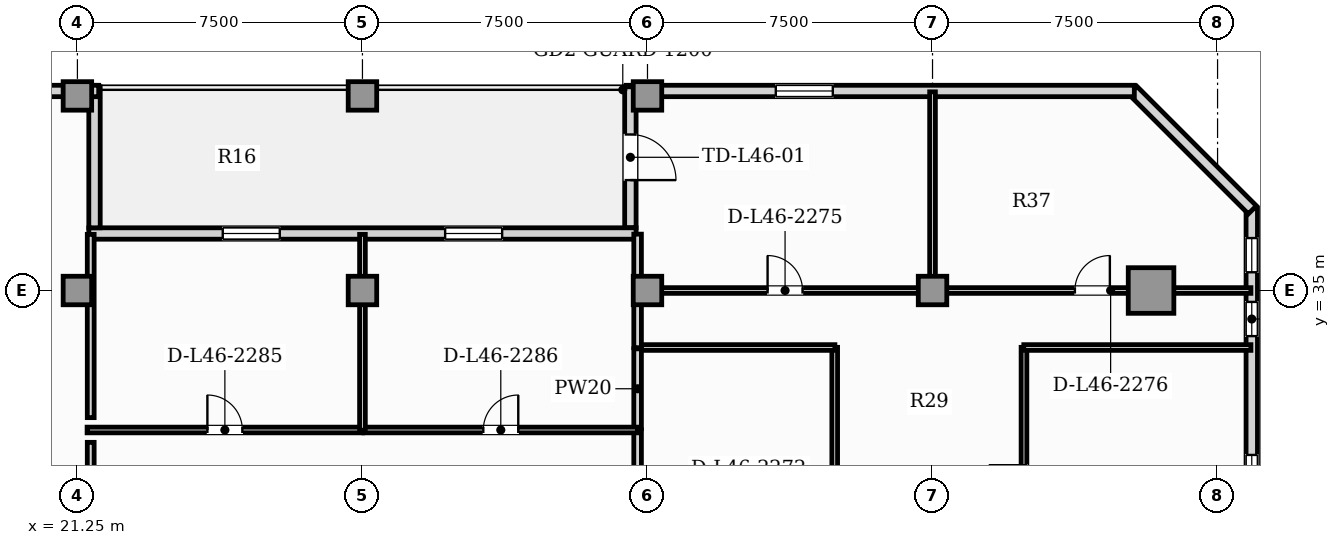
"""IFC4 building model, lengths in metres.
Left out: names, types, materials, properties, quantities, classifications, styles, units other than length and angle.
Written with IfcOpenShell. Run it as: python <this file> out.ifc"""

import sys

from ifc_helpers import new_model, si_unit, direction, frame, frame_2d, origin, origin_2d, place, context, subcontext, project, spatial, rectangle, hollow_rectangle, extrude, element, fill, save


model = new_model("IFC4")
c1 = context("Model", 3, precision=1e-05, world=origin(), true_north=direction((0.0, 1.0)))
c2 = subcontext(c1, "Body", "Model", "MODEL_VIEW")
j1 = project(units=[si_unit("LENGTHUNIT", "METRE"), si_unit("PLANEANGLEUNIT", "RADIAN")], contexts=[c1])
p1 = place(None, origin())
s1 = spatial("IfcSite", under=j1, at=p1, CompositionType="ELEMENT")
p2 = place(p1, origin())
s2 = spatial("IfcBuilding", under=s1, at=p2, CompositionType="ELEMENT")
p3 = place(p2, frame((0.0, 0.0, 187.55)))
s3 = spatial("IfcBuildingStorey", under=s2, at=p3, CompositionType="ELEMENT", Elevation=187.55)
p4 = place(p3, frame((49.5, 35.0, 0.0), z_axis=(0.0, 0.0, 1.0), x_axis=(1.0, 0.0, 0.0)))
e1 = element("IfcColumn", 1, at=p4, inside=s3, PredefinedType="USERDEFINED", context=c2, shape_type="SweptSolid", body=[
    extrude(hollow_rectangle(XDim=1.2, YDim=1.2, WallThickness=0.07, at=origin_2d()), origin(), (0.0, 0.0, 1.0), 5.05),
])
for number, where, z_axis, x_axis in (
    (2, (21.25, 40.12, 0.0), (0.0, 0.0, 1.0), (1.0, 0.0, 0.0)),
    (3, (28.75, 40.12, 0.0), (0.0, 0.0, 1.0), (1.0, 0.0, 0.0)),
    (4, (36.25, 40.12, 0.0), (0.0, 0.0, 1.0), (1.0, 0.0, 0.0)),
    (5, (21.25, 35.0, 0.0), (0.0, 0.0, 1.0), (1.0, 0.0, 0.0)),
    (6, (28.75, 35.0, 0.0), (0.0, 0.0, 1.0), (1.0, 0.0, 0.0)),
    (7, (36.25, 35.0, 0.0), (0.0, 0.0, 1.0), (1.0, 0.0, 0.0)),
    (8, (43.75, 35.0, 0.0), (0.0, 0.0, 1.0), (1.0, 0.0, 0.0)),
):
    element("IfcColumn", number, at=place(p3, frame(where, z_axis=z_axis, x_axis=x_axis)), inside=s3, PredefinedType="COLUMN", context=c2, shape_type="SweptSolid", body=[
        extrude(rectangle(XDim=0.75, YDim=0.75, at=origin_2d()), origin(), (0.0, 0.0, 1.0), 5.05),
    ])
p5 = place(p3, frame((52.15, 3.24, 0.0), z_axis=(0.0, 0.0, 1.0), x_axis=(0.0, 1.0, 0.0)))
e9 = element("IfcWall", 9, at=p5, inside=s3, PredefinedType="SOLIDWALL", context=c2, shape_type="SweptSolid", body=[
    extrude(rectangle(XDim=33.92, YDim=0.3, at=frame_2d((16.96, 0.0))), origin(), (0.0, 0.0, 1.0), 4.83),
])
p6 = place(p5, frame((30.56, 0.0, 0.95)))
e10 = element("IfcOpeningElement", 10, at=p6, cuts=e9, PredefinedType="OPENING", context=c2, shape_type="SweptSolid", body=[
    extrude(rectangle(XDim=0.9, YDim=1.5, at=frame_2d((0.45, 0.75))), frame((0.0, 0.16, 0.0), z_axis=(0.0, -1.0, 0.0), x_axis=(1.0, 0.0, 0.0)), (0.0, 0.0, 1.0), 0.32),
])
p7 = place(p5, frame((10.805, 0.0, 0.9)))
e11 = element("IfcOpeningElement", 11, at=p7, cuts=e9, PredefinedType="OPENING", context=c2, shape_type="SweptSolid", body=[
    extrude(rectangle(XDim=1.5, YDim=1.95, at=frame_2d((0.75, 0.975))), frame((0.0, 0.16, 0.0), z_axis=(0.0, -1.0, 0.0), x_axis=(1.0, 0.0, 0.0)), (0.0, 0.0, 1.0), 0.32),
])
p8 = place(p5, frame((14.462, 0.0, 0.9)))
e12 = element("IfcOpeningElement", 12, at=p8, cuts=e9, PredefinedType="OPENING", context=c2, shape_type="SweptSolid", body=[
    extrude(rectangle(XDim=1.5, YDim=1.95, at=frame_2d((0.75, 0.975))), frame((0.0, 0.16, 0.0), z_axis=(0.0, -1.0, 0.0), x_axis=(1.0, 0.0, 0.0)), (0.0, 0.0, 1.0), 0.32),
])
p9 = place(p5, frame((19.726, 0.0, 0.9)))
e13 = element("IfcOpeningElement", 13, at=p9, cuts=e9, PredefinedType="OPENING", context=c2, shape_type="SweptSolid", body=[
    extrude(rectangle(XDim=1.5, YDim=1.95, at=frame_2d((0.75, 0.975))), frame((0.0, 0.16, 0.0), z_axis=(0.0, -1.0, 0.0), x_axis=(1.0, 0.0, 0.0)), (0.0, 0.0, 1.0), 0.32),
])
p10 = place(p5, frame((25.934, 0.0, 0.9)))
e14 = element("IfcOpeningElement", 14, at=p10, cuts=e9, PredefinedType="OPENING", context=c2, shape_type="SweptSolid", body=[
    extrude(rectangle(XDim=1.5, YDim=1.95, at=frame_2d((0.75, 0.975))), frame((0.0, 0.16, 0.0), z_axis=(0.0, -1.0, 0.0), x_axis=(1.0, 0.0, 0.0)), (0.0, 0.0, 1.0), 0.32),
])
p11 = place(p5, frame((32.24, 0.0, 0.95)))
e15 = element("IfcOpeningElement", 15, at=p11, cuts=e9, PredefinedType="OPENING", context=c2, shape_type="SweptSolid", body=[
    extrude(rectangle(XDim=0.9, YDim=1.5, at=frame_2d((0.45, 0.75))), frame((0.0, 0.16, 0.0), z_axis=(0.0, -1.0, 0.0), x_axis=(1.0, 0.0, 0.0)), (0.0, 0.0, 1.0), 0.32),
])
p12 = place(p3, frame((52.166, 37.122, 0.0), z_axis=(0.0, 0.0, 1.0), x_axis=(-0.707106781187, 0.707106781187, 0.0)))
e16 = element("IfcWall", 16, at=p12, inside=s3, PredefinedType="SOLIDWALL", context=c2, shape_type="SweptSolid", body=[
    extrude(rectangle(XDim=4.445, YDim=0.3, at=frame_2d((2.223, 0.0))), origin(), (0.0, 0.0, 1.0), 4.83),
])
p13 = place(p3, frame((49.06, 40.25, 0.0), z_axis=(0.0, 0.0, 1.0), x_axis=(-1.0, 0.0, 0.0)))
e17 = element("IfcWall", 17, at=p13, inside=s3, PredefinedType="SOLIDWALL", context=c2, shape_type="SweptSolid", body=[
    extrude(rectangle(XDim=13.37, YDim=0.3, at=frame_2d((6.685, 0.0))), origin(), (0.0, 0.0, 1.0), 4.37),
])
p14 = place(p13, frame((7.934, 0.0, 0.9)))
e18 = element("IfcOpeningElement", 18, at=p14, cuts=e17, PredefinedType="OPENING", context=c2, shape_type="SweptSolid", body=[
    extrude(rectangle(XDim=1.5, YDim=1.95, at=frame_2d((0.75, 0.975))), frame((0.0, 0.16, 0.0), z_axis=(0.0, -1.0, 0.0), x_axis=(1.0, 0.0, 0.0)), (0.0, 0.0, 1.0), 0.32),
])
p15 = place(p3, frame((35.8, 40.36, 0.0), z_axis=(0.0, 0.0, 1.0), x_axis=(0.0, -1.0, 0.0)))
e19 = element("IfcWall", 19, at=p15, inside=s3, PredefinedType="SOLIDWALL", context=c2, shape_type="SweptSolid", body=[
    extrude(rectangle(XDim=3.71, YDim=0.3, at=frame_2d((1.855, 0.0))), origin(), (0.0, 0.0, 1.0), 4.83),
])
p16 = place(p15, frame((1.255, 0.0, 0.0)))
e20 = element("IfcOpeningElement", 20, at=p16, cuts=e19, PredefinedType="OPENING", context=c2, shape_type="SweptSolid", body=[
    extrude(rectangle(XDim=1.2, YDim=2.2, at=frame_2d((0.6, 1.1))), frame((0.0, 0.16, 0.0), z_axis=(0.0, -1.0, 0.0), x_axis=(1.0, 0.0, 0.0)), (0.0, 0.0, 1.0), 0.32),
])
p17 = place(p3, frame((35.95, 36.5, 0.0), z_axis=(0.0, 0.0, 1.0), x_axis=(-1.0, 0.0, 0.0)))
e21 = element("IfcWall", 21, at=p17, inside=s3, PredefinedType="SOLIDWALL", context=c2, shape_type="SweptSolid", body=[
    extrude(rectangle(XDim=14.4, YDim=0.3, at=frame_2d((7.2, 0.0))), origin(), (0.0, 0.0, 1.0), 4.83),
])
p18 = place(p17, frame((9.376, 0.0, 0.9)))
e22 = element("IfcOpeningElement", 22, at=p18, cuts=e21, PredefinedType="OPENING", context=c2, shape_type="SweptSolid", body=[
    extrude(rectangle(XDim=1.5, YDim=1.95, at=frame_2d((0.75, 0.975))), frame((0.0, 0.16, 0.0), z_axis=(0.0, -1.0, 0.0), x_axis=(1.0, 0.0, 0.0)), (0.0, 0.0, 1.0), 0.32),
])
p19 = place(p17, frame((3.524, 0.0, 0.9)))
e23 = element("IfcOpeningElement", 23, at=p19, cuts=e21, PredefinedType="OPENING", context=c2, shape_type="SweptSolid", body=[
    extrude(rectangle(XDim=1.5, YDim=1.95, at=frame_2d((0.75, 0.975))), frame((0.0, 0.16, 0.0), z_axis=(0.0, -1.0, 0.0), x_axis=(1.0, 0.0, 0.0)), (0.0, 0.0, 1.0), 0.32),
])
p20 = place(p3, frame((21.7, 36.65, 0.0), z_axis=(0.0, 0.0, 1.0), x_axis=(0.0, 1.0, 0.0)))
e24 = element("IfcWall", 24, at=p20, inside=s3, PredefinedType="SOLIDWALL", context=c2, shape_type="SweptSolid", body=[
    extrude(rectangle(XDim=3.71, YDim=0.3, at=frame_2d((1.855, 0.0))), origin(), (0.0, 0.0, 1.0), 4.83),
])
p21 = place(p3, frame((21.81, 40.25, 0.0), z_axis=(0.0, 0.0, 1.0), x_axis=(-1.0, 0.0, 0.0)))
e25 = element("IfcWall", 25, at=p21, inside=s3, PredefinedType="SOLIDWALL", context=c2, shape_type="SweptSolid", body=[
    extrude(rectangle(XDim=13.37, YDim=0.3, at=frame_2d((6.685, 0.0))), origin(), (0.0, 0.0, 1.0), 4.37),
])
p22 = place(p21, frame((11.1, 0.0, 0.9)))
e26 = element("IfcOpeningElement", 26, at=p22, cuts=e25, PredefinedType="OPENING", context=c2, shape_type="SweptSolid", body=[
    extrude(rectangle(XDim=1.5, YDim=1.95, at=frame_2d((0.75, 0.975))), frame((0.0, 0.16, 0.0), z_axis=(0.0, -1.0, 0.0), x_axis=(1.0, 0.0, 0.0)), (0.0, 0.0, 1.0), 0.32),
])
p23 = place(p21, frame((8.725, 0.0, 0.9)))
e27 = element("IfcOpeningElement", 27, at=p23, cuts=e25, PredefinedType="OPENING", context=c2, shape_type="SweptSolid", body=[
    extrude(rectangle(XDim=1.5, YDim=1.95, at=frame_2d((0.75, 0.975))), frame((0.0, 0.16, 0.0), z_axis=(0.0, -1.0, 0.0), x_axis=(1.0, 0.0, 0.0)), (0.0, 0.0, 1.0), 0.32),
])
p24 = place(p3, frame((41.177, 23.756, 0.0), z_axis=(0.0, 0.0, 1.0), x_axis=(0.0, 1.0, 0.0)))
e28 = element("IfcWall", 28, at=p24, inside=s3, PredefinedType="PARTITIONING", context=c2, shape_type="SweptSolid", body=[
    extrude(rectangle(XDim=9.749, YDim=0.15, at=frame_2d((4.875, 0.0))), origin(), (0.0, 0.0, 1.0), 4.83),
])
p25 = place(p24, frame((4.415, 0.0, 0.0)))
e29 = element("IfcOpeningElement", 29, at=p25, cuts=e28, PredefinedType="OPENING", context=c2, shape_type="SweptSolid", body=[
    extrude(rectangle(XDim=0.92, YDim=2.1, at=frame_2d((0.46, 1.05))), frame((0.0, 0.085, 0.0), z_axis=(0.0, -1.0, 0.0), x_axis=(1.0, 0.0, 0.0)), (0.0, 0.0, 1.0), 0.17),
])
p26 = place(p3, frame((35.985, 33.5, 0.0), z_axis=(0.0, 0.0, 1.0), x_axis=(1.0, 0.0, 0.0)))
e30 = element("IfcWall", 30, at=p26, inside=s3, PredefinedType="PARTITIONING", context=c2, shape_type="SweptSolid", body=[
    extrude(rectangle(XDim=5.196, YDim=0.15, at=frame_2d((2.598, 0.0))), origin(), (0.0, 0.0, 1.0), 4.83),
])
p27 = place(p3, frame((46.156, 26.382, 0.0), z_axis=(0.0, 0.0, 1.0), x_axis=(0.0, 1.0, 0.0)))
e31 = element("IfcWall", 31, at=p27, inside=s3, PredefinedType="PARTITIONING", context=c2, shape_type="SweptSolid", body=[
    extrude(rectangle(XDim=7.123, YDim=0.15, at=frame_2d((3.561, 0.0))), origin(), (0.0, 0.0, 1.0), 4.83),
])
p28 = place(p27, frame((3.101, 0.0, 0.0)))
e32 = element("IfcOpeningElement", 32, at=p28, cuts=e31, PredefinedType="OPENING", context=c2, shape_type="SweptSolid", body=[
    extrude(rectangle(XDim=0.92, YDim=2.1, at=frame_2d((0.46, 1.05))), frame((0.0, 0.085, 0.0), z_axis=(0.0, -1.0, 0.0), x_axis=(1.0, 0.0, 0.0)), (0.0, 0.0, 1.0), 0.17),
])
p29 = place(p3, frame((46.151, 33.5, 0.0), z_axis=(0.0, 0.0, 1.0), x_axis=(1.0, 0.0, 0.0)))
e33 = element("IfcWall", 33, at=p29, inside=s3, PredefinedType="PARTITIONING", context=c2, shape_type="SweptSolid", body=[
    extrude(rectangle(XDim=5.976, YDim=0.15, at=frame_2d((2.988, 0.0))), origin(), (0.0, 0.0, 1.0), 4.83),
])
p30 = place(p3, frame((35.985, 35.0, 0.0), z_axis=(0.0, 0.0, 1.0), x_axis=(1.0, 0.0, 0.0)))
e34 = element("IfcWall", 34, at=p30, inside=s3, PredefinedType="PARTITIONING", context=c2, shape_type="SweptSolid", body=[
    extrude(rectangle(XDim=7.77, YDim=0.15, at=frame_2d((3.885, 0.0))), origin(), (0.0, 0.0, 1.0), 4.285),
])
p31 = place(p30, frame((3.425, 0.0, 0.0)))
e35 = element("IfcOpeningElement", 35, at=p31, cuts=e34, PredefinedType="OPENING", context=c2, shape_type="SweptSolid", body=[
    extrude(rectangle(XDim=0.92, YDim=2.1, at=frame_2d((0.46, 1.05))), frame((0.0, 0.085, 0.0), z_axis=(0.0, -1.0, 0.0), x_axis=(1.0, 0.0, 0.0)), (0.0, 0.0, 1.0), 0.17),
])
p32 = place(p3, frame((43.785, 35.0, 0.0), z_axis=(0.0, 0.0, 1.0), x_axis=(1.0, 0.0, 0.0)))
e36 = element("IfcWall", 36, at=p32, inside=s3, PredefinedType="PARTITIONING", context=c2, shape_type="SweptSolid", body=[
    extrude(rectangle(XDim=8.343, YDim=0.15, at=frame_2d((4.171, 0.0))), origin(), (0.0, 0.0, 1.0), 4.285),
])
p33 = place(p32, frame((3.711, 0.0, 0.0)))
e37 = element("IfcOpeningElement", 37, at=p33, cuts=e36, PredefinedType="OPENING", context=c2, shape_type="SweptSolid", body=[
    extrude(rectangle(XDim=0.92, YDim=2.1, at=frame_2d((0.46, 1.05))), frame((0.0, 0.085, 0.0), z_axis=(0.0, -1.0, 0.0), x_axis=(1.0, 0.0, 0.0)), (0.0, 0.0, 1.0), 0.17),
])
p34 = place(p3, frame((35.99, 33.495, 0.0), z_axis=(0.0, 0.0, 1.0), x_axis=(0.0, 1.0, 0.0)))
e38 = element("IfcWall", 38, at=p34, inside=s3, PredefinedType="PARTITIONING", context=c2, shape_type="SweptSolid", body=[
    extrude(rectangle(XDim=2.988, YDim=0.2, at=frame_2d((1.494, 0.0))), origin(), (0.0, 0.0, 1.0), 4.83),
])
p35 = place(p3, frame((35.99, 29.825, 0.0), z_axis=(0.0, 0.0, 1.0), x_axis=(0.0, 1.0, 0.0)))
e39 = element("IfcWall", 39, at=p35, inside=s3, PredefinedType="PARTITIONING", context=c2, shape_type="SweptSolid", body=[
    extrude(rectangle(XDim=1.51, YDim=0.2, at=frame_2d((0.755, 0.0))), origin(), (0.0, 0.0, 1.0), 4.83),
])
p36 = place(p3, frame((35.99, 31.365, 0.0), z_axis=(0.0, 0.0, 1.0), x_axis=(0.0, 1.0, 0.0)))
e40 = element("IfcWall", 40, at=p36, inside=s3, PredefinedType="PARTITIONING", context=c2, shape_type="SweptSolid", body=[
    extrude(rectangle(XDim=2.1, YDim=0.2, at=frame_2d((1.05, 0.0))), origin(), (0.0, 0.0, 1.0), 4.83),
])
p37 = place(p3, frame((43.75, 34.995, 0.0), z_axis=(0.0, 0.0, 1.0), x_axis=(0.0, 1.0, 0.0)))
e41 = element("IfcWall", 41, at=p37, inside=s3, PredefinedType="PARTITIONING", context=c2, shape_type="SweptSolid", body=[
    extrude(rectangle(XDim=5.232, YDim=0.15, at=frame_2d((2.616, 0.0))), origin(), (0.0, 0.0, 1.0), 4.83),
])
p38 = place(p3, frame((21.505, 31.33, 0.0), z_axis=(0.0, 0.0, 1.0), x_axis=(1.0, 0.0, 0.0)))
e42 = element("IfcWall", 42, at=p38, inside=s3, PredefinedType="PARTITIONING", context=c2, shape_type="SweptSolid", body=[
    extrude(rectangle(XDim=7.25, YDim=0.15, at=frame_2d((3.625, 0.0))), origin(), (0.0, 0.0, 1.0), 4.83),
])
p39 = place(p38, frame((3.165, 0.0, 0.0)))
e43 = element("IfcOpeningElement", 43, at=p39, cuts=e42, PredefinedType="OPENING", context=c2, shape_type="SweptSolid", body=[
    extrude(rectangle(XDim=0.92, YDim=2.1, at=frame_2d((0.46, 1.05))), frame((0.0, 0.085, 0.0), z_axis=(0.0, -1.0, 0.0), x_axis=(1.0, 0.0, 0.0)), (0.0, 0.0, 1.0), 0.17),
])
p40 = place(p3, frame((28.785, 31.33, 0.0), z_axis=(0.0, 0.0, 1.0), x_axis=(1.0, 0.0, 0.0)))
e44 = element("IfcWall", 44, at=p40, inside=s3, PredefinedType="PARTITIONING", context=c2, shape_type="SweptSolid", body=[
    extrude(rectangle(XDim=7.21, YDim=0.15, at=frame_2d((3.605, 0.0))), origin(), (0.0, 0.0, 1.0), 4.83),
])
p41 = place(p40, frame((3.145, 0.0, 0.0)))
e45 = element("IfcOpeningElement", 45, at=p41, cuts=e44, PredefinedType="OPENING", context=c2, shape_type="SweptSolid", body=[
    extrude(rectangle(XDim=0.92, YDim=2.1, at=frame_2d((0.46, 1.05))), frame((0.0, 0.085, 0.0), z_axis=(0.0, -1.0, 0.0), x_axis=(1.0, 0.0, 0.0)), (0.0, 0.0, 1.0), 0.17),
])
p42 = place(p3, frame((28.75, 31.325, 0.0), z_axis=(0.0, 0.0, 1.0), x_axis=(0.0, 1.0, 0.0)))
e46 = element("IfcWall", 46, at=p42, inside=s3, PredefinedType="PARTITIONING", context=c2, shape_type="SweptSolid", body=[
    extrude(rectangle(XDim=5.153, YDim=0.15, at=frame_2d((2.576, 0.0))), origin(), (0.0, 0.0, 1.0), 4.424),
])
p43 = place(p3, frame((21.6, 30.155, 0.0), z_axis=(0.0, 0.0, 1.0), x_axis=(0.0, 1.0, 0.0)))
e47 = element("IfcWall", 47, at=p43, inside=s3, PredefinedType="PARTITIONING", context=c2, shape_type="SweptSolid", body=[
    extrude(rectangle(XDim=0.85, YDim=0.18, at=frame_2d((0.425, 0.0))), origin(), (0.0, 0.0, 1.0), 4.83),
])
p44 = place(p3, frame((21.6, 31.655, 0.0), z_axis=(0.0, 0.0, 1.0), x_axis=(0.0, 1.0, 0.0)))
e48 = element("IfcWall", 48, at=p44, inside=s3, PredefinedType="PARTITIONING", context=c2, shape_type="SweptSolid", body=[
    extrude(rectangle(XDim=4.823, YDim=0.18, at=frame_2d((2.411, 0.0))), origin(), (0.0, 0.0, 1.0), 4.83),
])
p45 = place(p16, frame((1.2, 0.0, 0.0), z_axis=(0.0, 0.0, 1.0), x_axis=(-1.0, 0.0, 0.0)))
e49 = element("IfcDoor", 49, at=p45, inside=s3, OperationType="SINGLE_SWING_LEFT", PredefinedType="DOOR", context=c2, shape_type="SweptSolid", body=[
    extrude(rectangle(XDim=1.2, YDim=2.2, at=frame_2d((0.6, 1.1))), frame((0.0, 0.025, 0.0), z_axis=(0.0, -1.0, 0.0), x_axis=(1.0, 0.0, 0.0)), (0.0, 0.0, 1.0), 0.05),
])
fill(e20, e49)
p46 = place(p6, origin())
e50 = element("IfcWindow", 50, at=p46, inside=s3, PartitioningType="SINGLE_PANEL", PredefinedType="WINDOW", context=c2, shape_type="SweptSolid", body=[
    extrude(rectangle(XDim=0.9, YDim=1.5, at=frame_2d((0.45, 0.75))), frame((0.0, 0.03, 0.0), z_axis=(0.0, -1.0, 0.0), x_axis=(1.0, 0.0, 0.0)), (0.0, 0.0, 1.0), 0.06),
])
fill(e10, e50)
p47 = place(p10, origin())
e51 = element("IfcWindow", 51, at=p47, inside=s3, PartitioningType="SINGLE_PANEL", PredefinedType="WINDOW", context=c2, shape_type="SweptSolid", body=[
    extrude(rectangle(XDim=1.5, YDim=1.95, at=frame_2d((0.75, 0.975))), frame((0.0, 0.03, 0.0), z_axis=(0.0, -1.0, 0.0), x_axis=(1.0, 0.0, 0.0)), (0.0, 0.0, 1.0), 0.06),
])
fill(e14, e51)
p48 = place(p14, origin())
e52 = element("IfcWindow", 52, at=p48, inside=s3, PartitioningType="SINGLE_PANEL", PredefinedType="WINDOW", context=c2, shape_type="SweptSolid", body=[
    extrude(rectangle(XDim=1.5, YDim=1.95, at=frame_2d((0.75, 0.975))), frame((0.0, 0.03, 0.0), z_axis=(0.0, -1.0, 0.0), x_axis=(1.0, 0.0, 0.0)), (0.0, 0.0, 1.0), 0.06),
])
fill(e18, e52)
p49 = place(p11, origin())
e53 = element("IfcWindow", 53, at=p49, inside=s3, PartitioningType="SINGLE_PANEL", PredefinedType="WINDOW", context=c2, shape_type="SweptSolid", body=[
    extrude(rectangle(XDim=0.9, YDim=1.5, at=frame_2d((0.45, 0.75))), frame((0.0, 0.03, 0.0), z_axis=(0.0, -1.0, 0.0), x_axis=(1.0, 0.0, 0.0)), (0.0, 0.0, 1.0), 0.06),
])
fill(e15, e53)
p50 = place(p18, origin())
e54 = element("IfcWindow", 54, at=p50, inside=s3, PartitioningType="SINGLE_PANEL", PredefinedType="WINDOW", context=c2, shape_type="SweptSolid", body=[
    extrude(rectangle(XDim=1.5, YDim=1.95, at=frame_2d((0.75, 0.975))), frame((0.0, 0.03, 0.0), z_axis=(0.0, -1.0, 0.0), x_axis=(1.0, 0.0, 0.0)), (0.0, 0.0, 1.0), 0.06),
])
fill(e22, e54)
p51 = place(p19, origin())
e55 = element("IfcWindow", 55, at=p51, inside=s3, PartitioningType="SINGLE_PANEL", PredefinedType="WINDOW", context=c2, shape_type="SweptSolid", body=[
    extrude(rectangle(XDim=1.5, YDim=1.95, at=frame_2d((0.75, 0.975))), frame((0.0, 0.03, 0.0), z_axis=(0.0, -1.0, 0.0), x_axis=(1.0, 0.0, 0.0)), (0.0, 0.0, 1.0), 0.06),
])
fill(e23, e55)
p52 = place(p31, origin())
e56 = element("IfcDoor", 56, at=p52, inside=s3, OperationType="SINGLE_SWING_LEFT", PredefinedType="DOOR", context=c2, shape_type="SweptSolid", body=[
    extrude(rectangle(XDim=0.92, YDim=2.1, at=frame_2d((0.46, 1.05))), frame((0.0, 0.025, 0.0), z_axis=(0.0, -1.0, 0.0), x_axis=(1.0, 0.0, 0.0)), (0.0, 0.0, 1.0), 0.05),
])
fill(e35, e56)
p53 = place(p33, origin())
e57 = element("IfcDoor", 57, at=p53, inside=s3, OperationType="SINGLE_SWING_RIGHT", PredefinedType="DOOR", context=c2, shape_type="SweptSolid", body=[
    extrude(rectangle(XDim=0.92, YDim=2.1, at=frame_2d((0.46, 1.05))), frame((0.0, 0.025, 0.0), z_axis=(0.0, -1.0, 0.0), x_axis=(1.0, 0.0, 0.0)), (0.0, 0.0, 1.0), 0.05),
])
fill(e37, e57)
p54 = place(p39, origin())
e58 = element("IfcDoor", 58, at=p54, inside=s3, OperationType="SINGLE_SWING_LEFT", PredefinedType="DOOR", context=c2, shape_type="SweptSolid", body=[
    extrude(rectangle(XDim=0.92, YDim=2.1, at=frame_2d((0.46, 1.05))), frame((0.0, 0.025, 0.0), z_axis=(0.0, -1.0, 0.0), x_axis=(1.0, 0.0, 0.0)), (0.0, 0.0, 1.0), 0.05),
])
fill(e43, e58)
p55 = place(p41, origin())
e59 = element("IfcDoor", 59, at=p55, inside=s3, OperationType="SINGLE_SWING_RIGHT", PredefinedType="DOOR", context=c2, shape_type="SweptSolid", body=[
    extrude(rectangle(XDim=0.92, YDim=2.1, at=frame_2d((0.46, 1.05))), frame((0.0, 0.025, 0.0), z_axis=(0.0, -1.0, 0.0), x_axis=(1.0, 0.0, 0.0)), (0.0, 0.0, 1.0), 0.05),
])
fill(e45, e59)
save(model, sys.argv[1])
